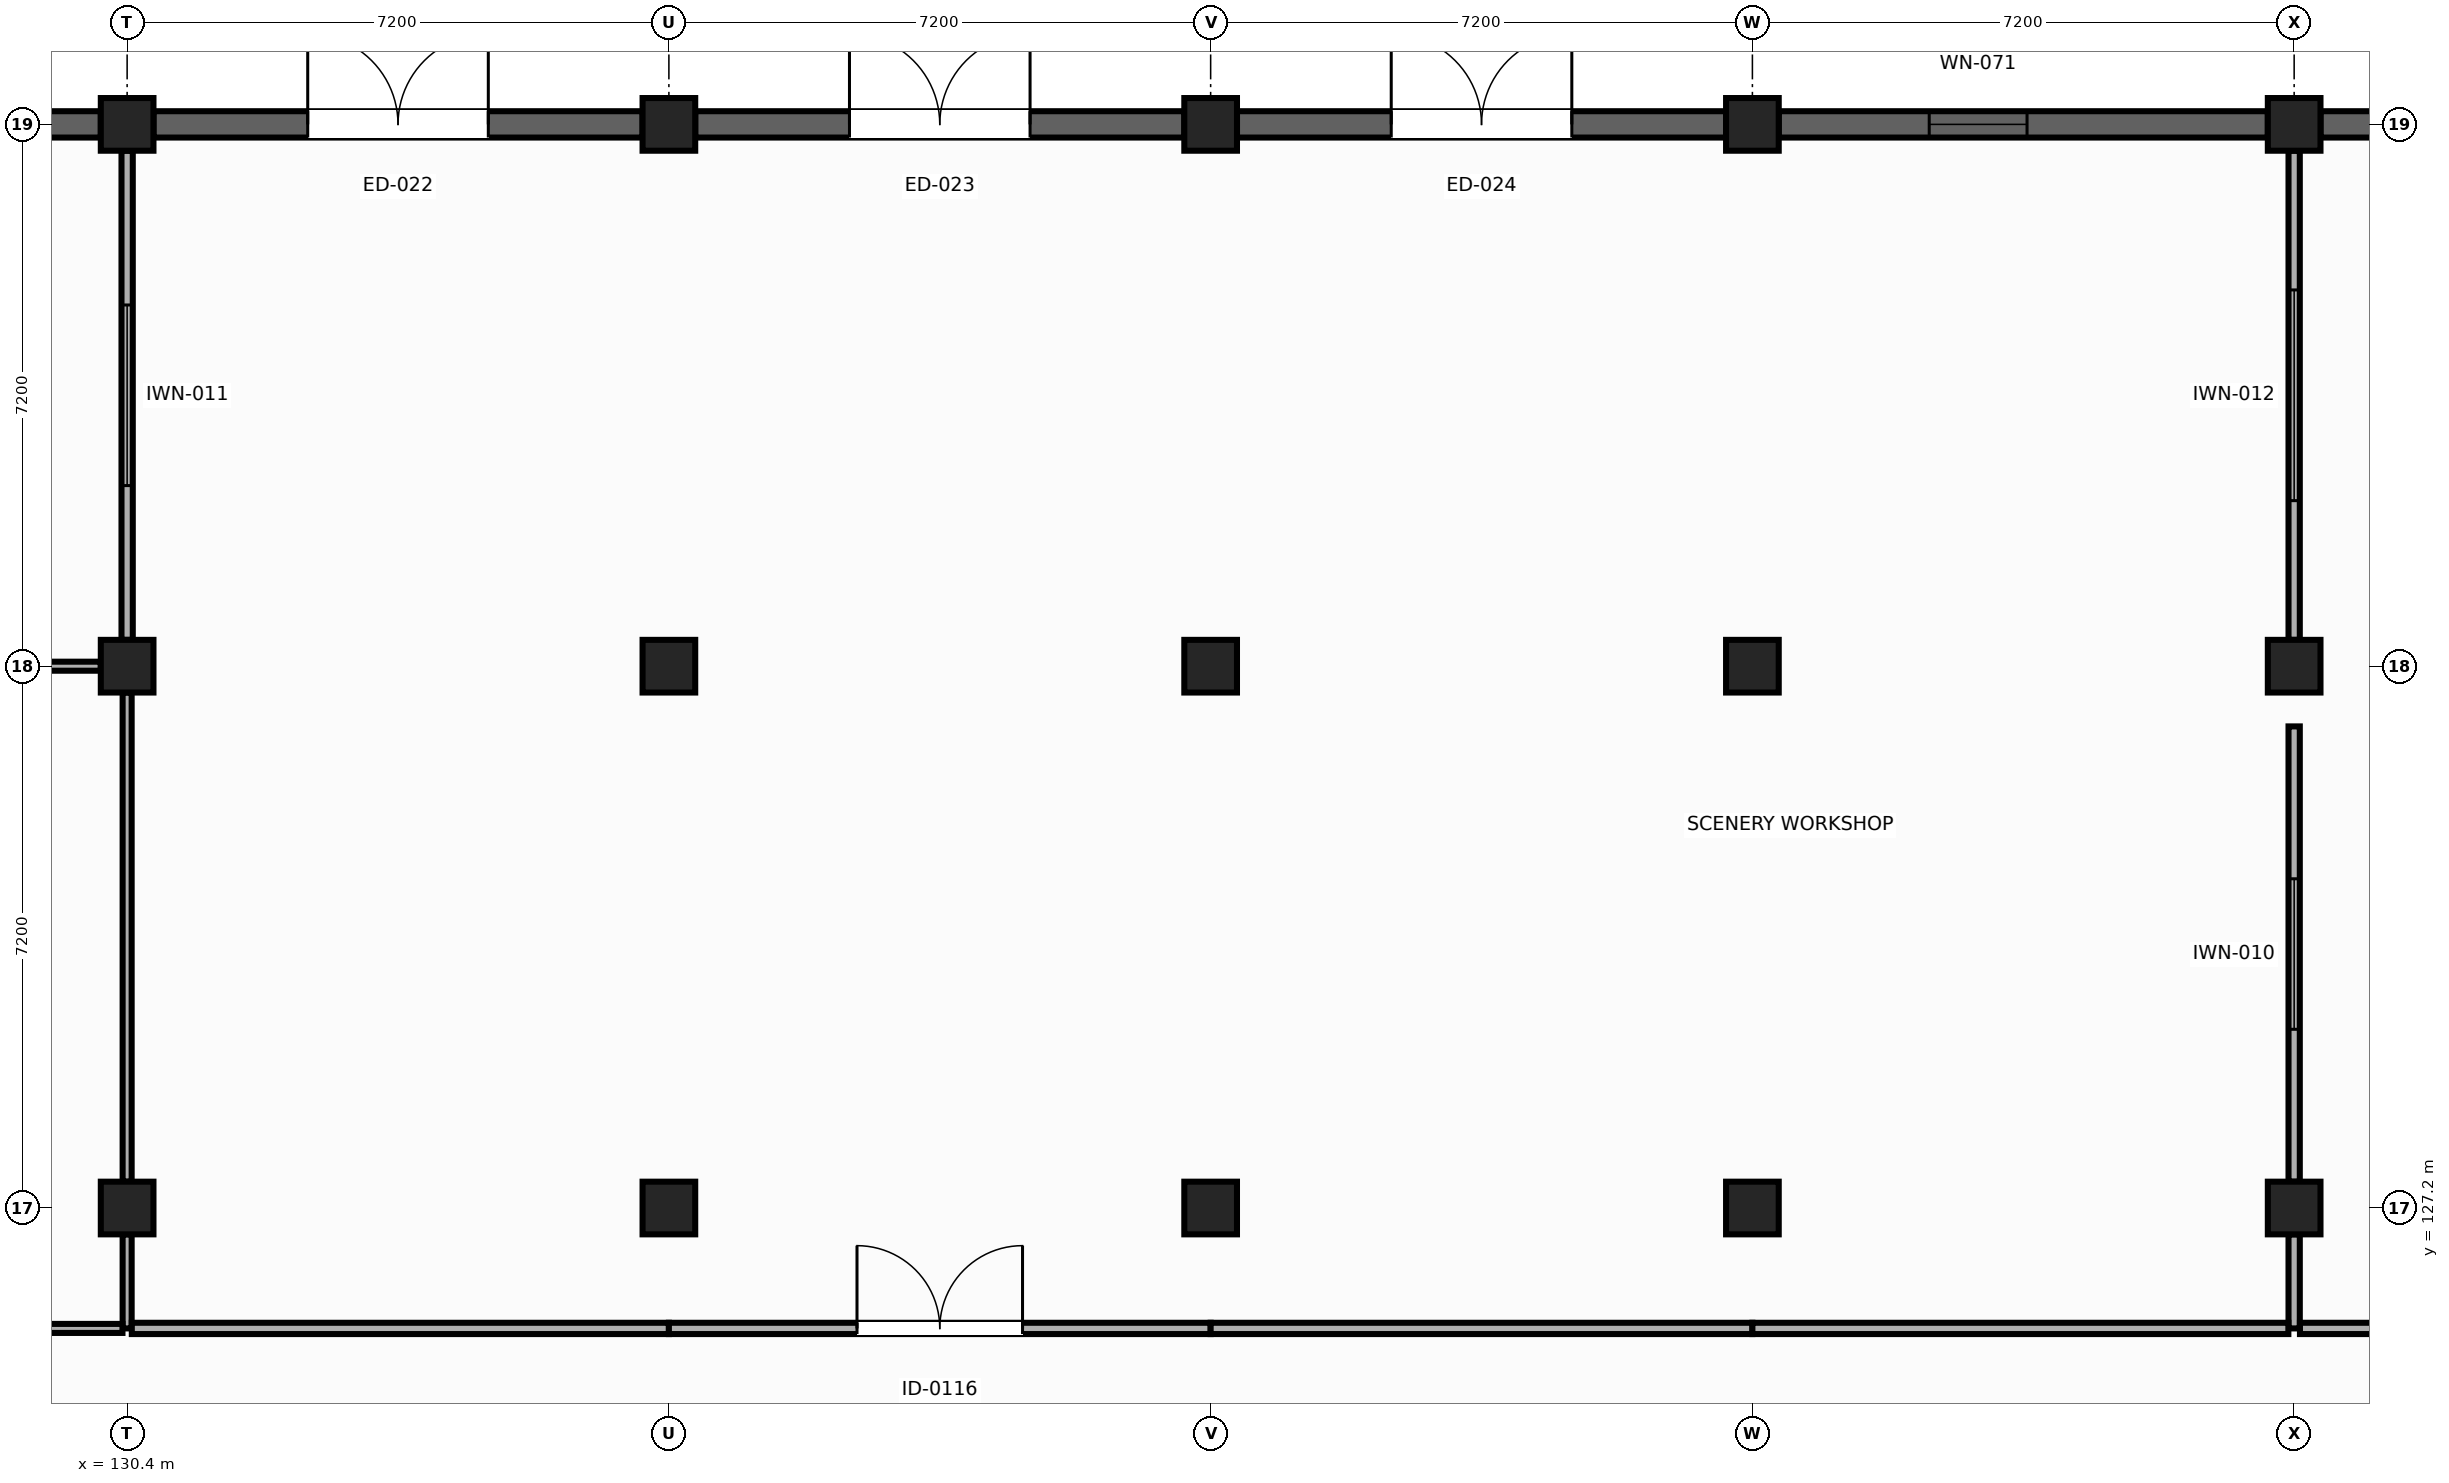
"""IFC4 building model, lengths in metres.
Left out: names, types, materials, properties, quantities, classifications, styles, units other than length and angle.
Written with IfcOpenShell. Run it as: python <this file> out.ifc"""

import sys

from ifc_helpers import new_model, si_unit, direction, frame, frame_2d, origin, origin_2d, place, context, subcontext, project, spatial, rectangle, extrude, element, fill, save


model = new_model("IFC4")
c1 = context("Model", 3, precision=1e-05, world=origin(), true_north=direction((0.0, 1.0)))
c2 = subcontext(c1, "Body", "Model", "MODEL_VIEW")
j1 = project(units=[si_unit("LENGTHUNIT", "METRE"), si_unit("PLANEANGLEUNIT", "RADIAN")], contexts=[c1])
p1 = place(None, origin())
s1 = spatial("IfcSite", under=j1, at=p1, CompositionType="ELEMENT")
p2 = place(p1, origin())
s2 = spatial("IfcBuilding", under=s1, at=p2, CompositionType="ELEMENT")
p3 = place(p2, origin())
s3 = spatial("IfcBuildingStorey", under=s2, at=p3, CompositionType="ELEMENT", Elevation=0.0)
for number, where, z_axis, x_axis in (
    (1, (130.4, 127.2, 0.0), (0.0, 0.0, 1.0), (0.0, 1.0, 0.0)),
    (2, (137.6, 127.2, 0.0), (0.0, 0.0, 1.0), (1.0, 0.0, 0.0)),
    (3, (144.8, 127.2, 0.0), (0.0, 0.0, 1.0), (1.0, 0.0, 0.0)),
    (4, (152.0, 127.2, 0.0), (0.0, 0.0, 1.0), (0.0, 1.0, 0.0)),
    (5, (159.2, 127.2, 0.0), (0.0, 0.0, 1.0), (1.0, 0.0, 0.0)),
    (6, (130.4, 134.4, 0.0), (0.0, 0.0, 1.0), (1.0, 0.0, 0.0)),
    (7, (137.6, 134.4, 0.0), (0.0, 0.0, 1.0), (1.0, 0.0, 0.0)),
    (8, (144.8, 134.4, 0.0), (0.0, 0.0, 1.0), (0.0, 1.0, 0.0)),
    (9, (152.0, 134.4, 0.0), (0.0, 0.0, 1.0), (1.0, 0.0, 0.0)),
    (10, (159.2, 134.4, 0.0), (0.0, 0.0, 1.0), (0.0, 1.0, 0.0)),
    (11, (130.4, 141.6, 0.0), (0.0, 0.0, 1.0), (1.0, 0.0, 0.0)),
    (12, (137.6, 141.6, 0.0), (0.0, 0.0, 1.0), (0.0, 1.0, 0.0)),
    (13, (144.8, 141.6, 0.0), (0.0, 0.0, 1.0), (1.0, 0.0, 0.0)),
    (14, (152.0, 141.6, 0.0), (0.0, 0.0, 1.0), (0.0, 1.0, 0.0)),
    (15, (159.2, 141.6, 0.0), (0.0, 0.0, 1.0), (1.0, 0.0, 0.0)),
):
    element("IfcColumn", number, at=place(p3, frame(where, z_axis=z_axis, x_axis=x_axis)), inside=s3, PredefinedType="COLUMN", context=c2, shape_type="SweptSolid", body=[
        extrude(rectangle(XDim=0.7, YDim=0.7, at=origin_2d()), origin(), (0.0, 0.0, 1.0), 5.4),
    ])
p4 = place(p3, frame((123.55, 141.6, 0.0), z_axis=(0.0, 0.0, 1.0), x_axis=(1.0, 0.0, 0.0)))
e16 = element("IfcWall", 16, at=p4, inside=s3, PredefinedType="SOLIDWALL", context=c2, shape_type="SweptSolid", body=[
    extrude(rectangle(XDim=6.5, YDim=0.35, at=frame_2d((3.25, 0.0))), origin(), (0.0, 0.0, 1.0), 5.12),
])
p5 = place(p4, frame((1.95, 0.0, 0.9)))
e17 = element("IfcOpeningElement", 17, at=p5, cuts=e16, PredefinedType="OPENING", context=c2, shape_type="SweptSolid", body=[
    extrude(rectangle(XDim=2.6, YDim=2.4, at=frame_2d((1.3, 1.2))), frame((0.0, 0.185, 0.0), z_axis=(0.0, -1.0, 0.0), x_axis=(1.0, 0.0, 0.0)), (0.0, 0.0, 1.0), 0.37),
])
p6 = place(p3, frame((130.75, 141.6, 0.0), z_axis=(0.0, 0.0, 1.0), x_axis=(1.0, 0.0, 0.0)))
e18 = element("IfcWall", 18, at=p6, inside=s3, PredefinedType="SOLIDWALL", context=c2, shape_type="SweptSolid", body=[
    extrude(rectangle(XDim=6.5, YDim=0.35, at=frame_2d((3.25, 0.0))), origin(), (0.0, 0.0, 1.0), 5.12),
])
p7 = place(p6, frame((2.05, 0.0, 0.0)))
e19 = element("IfcOpeningElement", 19, at=p7, cuts=e18, PredefinedType="OPENING", context=c2, shape_type="SweptSolid", body=[
    extrude(rectangle(XDim=2.4, YDim=2.7, at=frame_2d((1.2, 1.35))), frame((0.0, 0.185, 0.0), z_axis=(0.0, -1.0, 0.0), x_axis=(1.0, 0.0, 0.0)), (0.0, 0.0, 1.0), 0.37),
])
p8 = place(p3, frame((137.95, 141.6, 0.0), z_axis=(0.0, 0.0, 1.0), x_axis=(1.0, 0.0, 0.0)))
e20 = element("IfcWall", 20, at=p8, inside=s3, PredefinedType="SOLIDWALL", context=c2, shape_type="SweptSolid", body=[
    extrude(rectangle(XDim=6.5, YDim=0.35, at=frame_2d((3.25, 0.0))), origin(), (0.0, 0.0, 1.0), 5.12),
])
p9 = place(p8, frame((2.05, 0.0, 0.0)))
e21 = element("IfcOpeningElement", 21, at=p9, cuts=e20, PredefinedType="OPENING", context=c2, shape_type="SweptSolid", body=[
    extrude(rectangle(XDim=2.4, YDim=2.7, at=frame_2d((1.2, 1.35))), frame((0.0, 0.185, 0.0), z_axis=(0.0, -1.0, 0.0), x_axis=(1.0, 0.0, 0.0)), (0.0, 0.0, 1.0), 0.37),
])
p10 = place(p3, frame((145.15, 141.6, 0.0), z_axis=(0.0, 0.0, 1.0), x_axis=(1.0, 0.0, 0.0)))
e22 = element("IfcWall", 22, at=p10, inside=s3, PredefinedType="SOLIDWALL", context=c2, shape_type="SweptSolid", body=[
    extrude(rectangle(XDim=6.5, YDim=0.35, at=frame_2d((3.25, 0.0))), origin(), (0.0, 0.0, 1.0), 5.12),
])
p11 = place(p10, frame((2.05, 0.0, 0.0)))
e23 = element("IfcOpeningElement", 23, at=p11, cuts=e22, PredefinedType="OPENING", context=c2, shape_type="SweptSolid", body=[
    extrude(rectangle(XDim=2.4, YDim=2.7, at=frame_2d((1.2, 1.35))), frame((0.0, 0.185, 0.0), z_axis=(0.0, -1.0, 0.0), x_axis=(1.0, 0.0, 0.0)), (0.0, 0.0, 1.0), 0.37),
])
p12 = place(p3, frame((152.35, 141.6, 0.0), z_axis=(0.0, 0.0, 1.0), x_axis=(1.0, 0.0, 0.0)))
e24 = element("IfcWall", 24, at=p12, inside=s3, PredefinedType="SOLIDWALL", context=c2, shape_type="SweptSolid", body=[
    extrude(rectangle(XDim=6.5, YDim=0.35, at=frame_2d((3.25, 0.0))), origin(), (0.0, 0.0, 1.0), 5.12),
])
p13 = place(p12, frame((2.0, 0.0, 0.9)))
e25 = element("IfcOpeningElement", 25, at=p13, cuts=e24, PredefinedType="OPENING", context=c2, shape_type="SweptSolid", body=[
    extrude(rectangle(XDim=1.3, YDim=1.6, at=frame_2d((0.65, 0.8))), frame((0.0, 0.185, 0.0), z_axis=(0.0, -1.0, 0.0), x_axis=(1.0, 0.0, 0.0)), (0.0, 0.0, 1.0), 0.37),
])
p14 = place(p3, frame((159.55, 141.6, 0.0), z_axis=(0.0, 0.0, 1.0), x_axis=(1.0, 0.0, 0.0)))
e26 = element("IfcWall", 26, at=p14, inside=s3, PredefinedType="SOLIDWALL", context=c2, shape_type="SweptSolid", body=[
    extrude(rectangle(XDim=6.5, YDim=0.35, at=frame_2d((3.25, 0.0))), origin(), (0.0, 0.0, 1.0), 5.12),
])
p15 = place(p3, frame((130.4, 127.55, 0.0), z_axis=(0.0, 0.0, 1.0), x_axis=(0.0, 1.0, 0.0)))
e27 = element("IfcWall", 27, at=p15, inside=s3, PredefinedType="PARTITIONING", context=c2, shape_type="SweptSolid", body=[
    extrude(rectangle(XDim=6.5, YDim=0.12, at=frame_2d((3.25, 0.0))), origin(), (0.0, 0.0, 1.0), 4.315),
])
p16 = place(p3, frame((130.4, 125.6, 0.0), z_axis=(0.0, 0.0, 1.0), x_axis=(0.0, 1.0, 0.0)))
e28 = element("IfcWall", 28, at=p16, inside=s3, PredefinedType="PARTITIONING", context=c2, shape_type="SweptSolid", body=[
    extrude(rectangle(XDim=1.25, YDim=0.12, at=frame_2d((0.625, 0.0))), origin(), (0.0, 0.0, 1.0), 4.315),
])
p17 = place(p3, frame((130.05, 134.4, 0.0), z_axis=(0.0, 0.0, 1.0), x_axis=(-1.0, 0.0, 0.0)))
e29 = element("IfcWall", 29, at=p17, inside=s3, PredefinedType="PARTITIONING", context=c2, shape_type="SweptSolid", body=[
    extrude(rectangle(XDim=6.5, YDim=0.12, at=frame_2d((3.25, 0.0))), origin(), (0.0, 0.0, 1.0), 4.315),
])
p18 = place(p3, frame((123.2, 125.6, 0.0), z_axis=(0.0, 0.0, 1.0), x_axis=(1.0, 0.0, 0.0)))
e30 = element("IfcWall", 30, at=p18, inside=s3, PredefinedType="PARTITIONING", context=c2, shape_type="SweptSolid", body=[
    extrude(rectangle(XDim=7.138, YDim=0.12, at=frame_2d((3.569, 0.0))), origin(), (0.0, 0.0, 1.0), 4.315),
])
p19 = place(p3, frame((159.2, 127.55, 0.0), z_axis=(0.0, 0.0, 1.0), x_axis=(0.0, 1.0, 0.0)))
e31 = element("IfcWall", 31, at=p19, inside=s3, PredefinedType="PARTITIONING", context=c2, shape_type="SweptSolid", body=[
    extrude(rectangle(XDim=6.05, YDim=0.15, at=frame_2d((3.025, 0.0))), origin(), (0.0, 0.0, 1.0), 4.315),
])
p20 = place(p19, frame((2.025, 0.0, 1.1)))
e32 = element("IfcOpeningElement", 32, at=p20, cuts=e31, PredefinedType="OPENING", context=c2, shape_type="SweptSolid", body=[
    extrude(rectangle(XDim=2.0, YDim=1.1, at=frame_2d((1.0, 0.55))), frame((0.0, 0.085, 0.0), z_axis=(0.0, -1.0, 0.0), x_axis=(1.0, 0.0, 0.0)), (0.0, 0.0, 1.0), 0.17),
])
p21 = place(p3, frame((159.2, 125.6, 0.0), z_axis=(0.0, 0.0, 1.0), x_axis=(0.0, 1.0, 0.0)))
e33 = element("IfcWall", 33, at=p21, inside=s3, PredefinedType="PARTITIONING", context=c2, shape_type="SweptSolid", body=[
    extrude(rectangle(XDim=1.25, YDim=0.15, at=frame_2d((0.625, 0.0))), origin(), (0.0, 0.0, 1.0), 4.315),
])
p22 = place(p3, frame((159.2, 134.75, 0.0), z_axis=(0.0, 0.0, 1.0), x_axis=(0.0, 1.0, 0.0)))
e34 = element("IfcWall", 34, at=p22, inside=s3, PredefinedType="PARTITIONING", context=c2, shape_type="SweptSolid", body=[
    extrude(rectangle(XDim=6.5, YDim=0.15, at=frame_2d((3.25, 0.0))), origin(), (0.0, 0.0, 1.0), 4.315),
])
p23 = place(p22, frame((1.85, 0.0, 1.1)))
e35 = element("IfcOpeningElement", 35, at=p23, cuts=e34, PredefinedType="OPENING", context=c2, shape_type="SweptSolid", body=[
    extrude(rectangle(XDim=2.8, YDim=1.1, at=frame_2d((1.4, 0.55))), frame((0.0, 0.085, 0.0), z_axis=(0.0, -1.0, 0.0), x_axis=(1.0, 0.0, 0.0)), (0.0, 0.0, 1.0), 0.17),
])
p24 = place(p3, frame((130.4, 141.25, 0.0), z_axis=(0.0, 0.0, 1.0), x_axis=(0.0, -1.0, 0.0)))
e36 = element("IfcWall", 36, at=p24, inside=s3, PredefinedType="PARTITIONING", context=c2, shape_type="SweptSolid", body=[
    extrude(rectangle(XDim=6.5, YDim=0.15, at=frame_2d((3.25, 0.0))), origin(), (0.0, 0.0, 1.0), 4.315),
])
p25 = place(p24, frame((2.05, 0.0, 1.1)))
e37 = element("IfcOpeningElement", 37, at=p25, cuts=e36, PredefinedType="OPENING", context=c2, shape_type="SweptSolid", body=[
    extrude(rectangle(XDim=2.4, YDim=1.1, at=frame_2d((1.2, 0.55))), frame((0.0, 0.085, 0.0), z_axis=(0.0, -1.0, 0.0), x_axis=(1.0, 0.0, 0.0)), (0.0, 0.0, 1.0), 0.17),
])
p26 = place(p3, frame((130.462, 125.6, 0.0), z_axis=(0.0, 0.0, 1.0), x_axis=(1.0, 0.0, 0.0)))
e38 = element("IfcWall", 38, at=p26, inside=s3, PredefinedType="PARTITIONING", context=c2, shape_type="SweptSolid", body=[
    extrude(rectangle(XDim=7.138, YDim=0.15, at=frame_2d((3.569, 0.0))), origin(), (0.0, 0.0, 1.0), 4.315),
])
p27 = place(p3, frame((137.6, 125.6, 0.0), z_axis=(0.0, 0.0, 1.0), x_axis=(1.0, 0.0, 0.0)))
e39 = element("IfcWall", 39, at=p27, inside=s3, PredefinedType="PARTITIONING", context=c2, shape_type="SweptSolid", body=[
    extrude(rectangle(XDim=7.2, YDim=0.15, at=frame_2d((3.6, 0.0))), origin(), (0.0, 0.0, 1.0), 4.315),
])
p28 = place(p27, frame((2.5, 0.0, 0.0)))
e40 = element("IfcOpeningElement", 40, at=p28, cuts=e39, PredefinedType="OPENING", context=c2, shape_type="SweptSolid", body=[
    extrude(rectangle(XDim=2.2, YDim=2.6, at=frame_2d((1.1, 1.3))), frame((0.0, 0.085, 0.0), z_axis=(0.0, -1.0, 0.0), x_axis=(1.0, 0.0, 0.0)), (0.0, 0.0, 1.0), 0.17),
])
p29 = place(p3, frame((144.8, 125.6, 0.0), z_axis=(0.0, 0.0, 1.0), x_axis=(1.0, 0.0, 0.0)))
e41 = element("IfcWall", 41, at=p29, inside=s3, PredefinedType="PARTITIONING", context=c2, shape_type="SweptSolid", body=[
    extrude(rectangle(XDim=7.2, YDim=0.15, at=frame_2d((3.6, 0.0))), origin(), (0.0, 0.0, 1.0), 4.315),
])
p30 = place(p3, frame((152.0, 125.6, 0.0), z_axis=(0.0, 0.0, 1.0), x_axis=(1.0, 0.0, 0.0)))
e42 = element("IfcWall", 42, at=p30, inside=s3, PredefinedType="PARTITIONING", context=c2, shape_type="SweptSolid", body=[
    extrude(rectangle(XDim=7.123, YDim=0.15, at=frame_2d((3.562, 0.0))), origin(), (0.0, 0.0, 1.0), 4.315),
])
p31 = place(p3, frame((159.277, 125.6, 0.0), z_axis=(0.0, 0.0, 1.0), x_axis=(1.0, 0.0, 0.0)))
e43 = element("IfcWall", 43, at=p31, inside=s3, PredefinedType="PARTITIONING", context=c2, shape_type="SweptSolid", body=[
    extrude(rectangle(XDim=7.123, YDim=0.15, at=frame_2d((3.562, 0.0))), origin(), (0.0, 0.0, 1.0), 4.315),
])
p32 = place(p7, origin())
e44 = element("IfcDoor", 44, at=p32, inside=s3, OperationType="DOUBLE_DOOR_SINGLE_SWING", PredefinedType="DOOR", context=c2, shape_type="SweptSolid", body=[
    extrude(rectangle(XDim=2.4, YDim=2.7, at=frame_2d((1.2, 1.35))), frame((0.0, 0.025, 0.0), z_axis=(0.0, -1.0, 0.0), x_axis=(1.0, 0.0, 0.0)), (0.0, 0.0, 1.0), 0.05),
])
fill(e19, e44)
p33 = place(p9, origin())
e45 = element("IfcDoor", 45, at=p33, inside=s3, OperationType="DOUBLE_DOOR_SINGLE_SWING", PredefinedType="DOOR", context=c2, shape_type="SweptSolid", body=[
    extrude(rectangle(XDim=2.4, YDim=2.7, at=frame_2d((1.2, 1.35))), frame((0.0, 0.025, 0.0), z_axis=(0.0, -1.0, 0.0), x_axis=(1.0, 0.0, 0.0)), (0.0, 0.0, 1.0), 0.05),
])
fill(e21, e45)
p34 = place(p11, origin())
e46 = element("IfcDoor", 46, at=p34, inside=s3, OperationType="DOUBLE_DOOR_SINGLE_SWING", PredefinedType="DOOR", context=c2, shape_type="SweptSolid", body=[
    extrude(rectangle(XDim=2.4, YDim=2.7, at=frame_2d((1.2, 1.35))), frame((0.0, 0.025, 0.0), z_axis=(0.0, -1.0, 0.0), x_axis=(1.0, 0.0, 0.0)), (0.0, 0.0, 1.0), 0.05),
])
fill(e23, e46)
p35 = place(p13, origin())
e47 = element("IfcWindow", 47, at=p35, inside=s3, PartitioningType="SINGLE_PANEL", PredefinedType="WINDOW", context=c2, shape_type="SweptSolid", body=[
    extrude(rectangle(XDim=1.3, YDim=1.6, at=frame_2d((0.65, 0.8))), frame((0.0, 0.03, 0.0), z_axis=(0.0, -1.0, 0.0), x_axis=(1.0, 0.0, 0.0)), (0.0, 0.0, 1.0), 0.06),
])
fill(e25, e47)
p36 = place(p28, origin())
e48 = element("IfcDoor", 48, at=p36, inside=s3, OperationType="DOUBLE_DOOR_SINGLE_SWING", PredefinedType="DOOR", context=c2, shape_type="SweptSolid", body=[
    extrude(rectangle(XDim=2.2, YDim=2.6, at=frame_2d((1.1, 1.3))), frame((0.0, 0.025, 0.0), z_axis=(0.0, -1.0, 0.0), x_axis=(1.0, 0.0, 0.0)), (0.0, 0.0, 1.0), 0.05),
])
fill(e40, e48)
p37 = place(p20, origin())
e49 = element("IfcWindow", 49, at=p37, inside=s3, PartitioningType="SINGLE_PANEL", PredefinedType="WINDOW", context=c2, shape_type="SweptSolid", body=[
    extrude(rectangle(XDim=2.0, YDim=1.1, at=frame_2d((1.0, 0.55))), frame((0.0, 0.03, 0.0), z_axis=(0.0, -1.0, 0.0), x_axis=(1.0, 0.0, 0.0)), (0.0, 0.0, 1.0), 0.06),
])
fill(e32, e49)
p38 = place(p25, origin())
e50 = element("IfcWindow", 50, at=p38, inside=s3, PartitioningType="SINGLE_PANEL", PredefinedType="WINDOW", context=c2, shape_type="SweptSolid", body=[
    extrude(rectangle(XDim=2.4, YDim=1.1, at=frame_2d((1.2, 0.55))), frame((0.0, 0.03, 0.0), z_axis=(0.0, -1.0, 0.0), x_axis=(1.0, 0.0, 0.0)), (0.0, 0.0, 1.0), 0.06),
])
fill(e37, e50)
p39 = place(p23, origin())
e51 = element("IfcWindow", 51, at=p39, inside=s3, PartitioningType="SINGLE_PANEL", PredefinedType="WINDOW", context=c2, shape_type="SweptSolid", body=[
    extrude(rectangle(XDim=2.8, YDim=1.1, at=frame_2d((1.4, 0.55))), frame((0.0, 0.03, 0.0), z_axis=(0.0, -1.0, 0.0), x_axis=(1.0, 0.0, 0.0)), (0.0, 0.0, 1.0), 0.06),
])
fill(e35, e51)
save(model, sys.argv[1])
